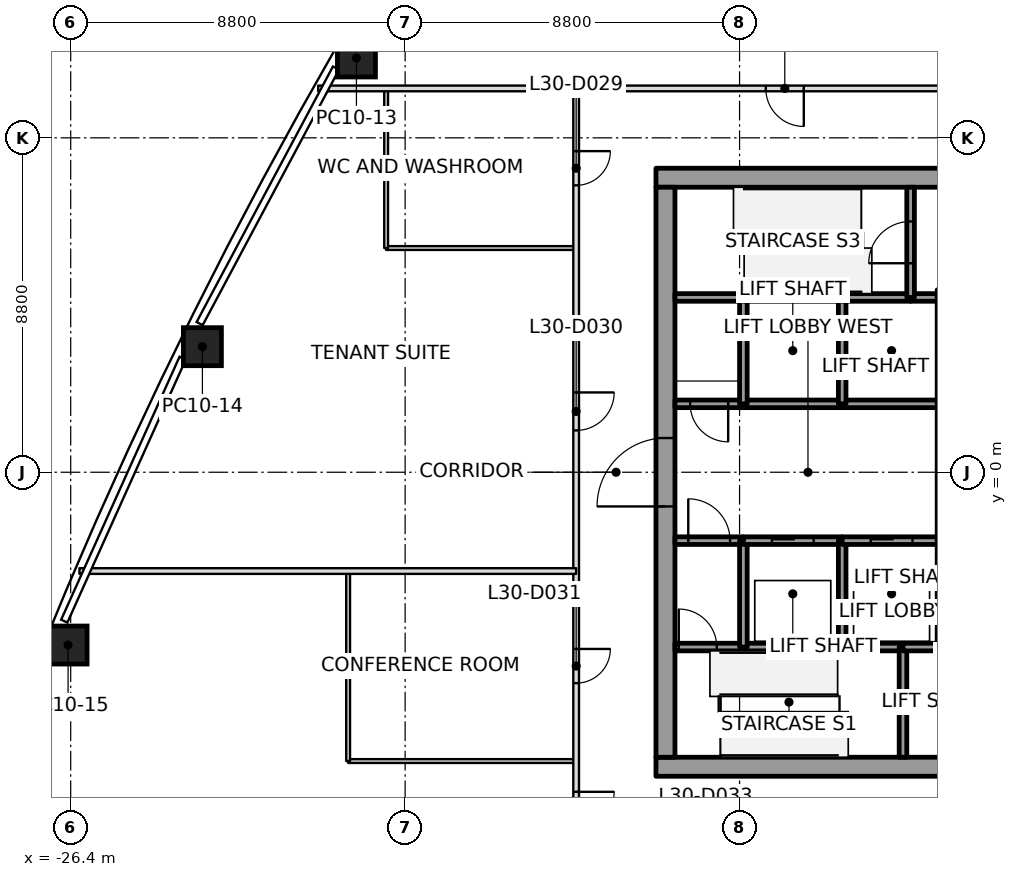
"""IFC4 building model, lengths in metres.
Left out: names, types, materials, properties, quantities, classifications, styles, units other than length and angle.
Written with IfcOpenShell. Run it as: python <this file> out.ifc"""

import sys

from ifc_helpers import new_model, si_unit, direction, frame, frame_2d, origin, origin_2d, place, context, subcontext, project, spatial, rectangle, extrude, element, fill, save


model = new_model("IFC4")
c1 = context("Model", 3, precision=1e-05, world=origin(), true_north=direction((0.0, 1.0)))
c2 = subcontext(c1, "Body", "Model", "MODEL_VIEW")
j1 = project(units=[si_unit("LENGTHUNIT", "METRE"), si_unit("PLANEANGLEUNIT", "RADIAN")], contexts=[c1])
p1 = place(None, origin())
s1 = spatial("IfcSite", under=j1, at=p1, CompositionType="ELEMENT")
p2 = place(p1, origin())
s2 = spatial("IfcBuilding", under=s1, at=p2, CompositionType="ELEMENT")
p3 = place(p2, frame((0.0, 0.0, 141.8)))
s3 = spatial("IfcBuildingStorey", under=s2, at=p3, CompositionType="ELEMENT", Elevation=141.8)
p4 = place(p3, frame((-18.882, 10.901, 0.0), z_axis=(0.009887052741, -0.005675900648, 0.999935013058), x_axis=(0.49997556095, 0.866039512773, -2.7732311e-05)))
e1 = element("IfcColumn", 1, at=p4, inside=s3, PredefinedType="COLUMN", context=c2, shape_type="SweptSolid", body=[
    extrude(rectangle(XDim=1.0, YDim=1.0, at=origin_2d()), origin(), (0.0, 0.0, 1.0), 4.0),
])
p5 = place(p3, frame((-22.935, 3.304, 0.0), z_axis=(0.014097689605, 0.002074984617, 0.999898469639), x_axis=(0.440788534912, 0.897574633958, -0.008077373603)))
e2 = element("IfcColumn", 2, at=p5, inside=s3, PredefinedType="COLUMN", context=c2, shape_type="SweptSolid", body=[
    extrude(rectangle(XDim=1.0, YDim=1.0, at=origin_2d()), origin(), (0.0, 0.0, 1.0), 4.0),
])
p6 = place(p3, frame((-26.469, -4.547, 0.0), z_axis=(0.017879535448, 0.010068680372, 0.999789449778), x_axis=(0.379623141119, 0.925001037033, -0.016104415983)))
e3 = element("IfcColumn", 3, at=p6, inside=s3, PredefinedType="COLUMN", context=c2, shape_type="SweptSolid", body=[
    extrude(rectangle(XDim=1.0, YDim=1.0, at=origin_2d()), origin(), (0.0, 0.0, 1.0), 4.001),
])
p7 = place(p3, frame((-11.0, -7.75, 0.0), z_axis=(0.0, 0.0, 1.0), x_axis=(1.0, 0.0, 0.0)))
e4 = element("IfcWall", 4, at=p7, inside=s3, PredefinedType="SHEAR", context=c2, shape_type="SweptSolid", body=[
    extrude(rectangle(XDim=22.0, YDim=0.5, at=frame_2d((11.0, 0.0))), origin(), (0.0, 0.0, 1.0), 4.0),
])
p8 = place(p7, frame((10.45, 0.0, 0.0)))
e5 = element("IfcOpeningElement", 5, at=p8, cuts=e4, PredefinedType="OPENING", context=c2, shape_type="SweptSolid", body=[
    extrude(rectangle(XDim=1.1, YDim=2.1, at=frame_2d((0.55, 1.05))), frame((0.0, 0.25, 0.0), z_axis=(0.0, -1.0, 0.0), x_axis=(1.0, 0.0, 0.0)), (0.0, 0.0, 1.0), 0.5),
])
p9 = place(p3, frame((-11.0, 7.75, 0.0), z_axis=(0.0, 0.0, 1.0), x_axis=(1.0, 0.0, 0.0)))
e6 = element("IfcWall", 6, at=p9, inside=s3, PredefinedType="SHEAR", context=c2, shape_type="SweptSolid", body=[
    extrude(rectangle(XDim=22.0, YDim=0.5, at=frame_2d((11.0, 0.0))), origin(), (0.0, 0.0, 1.0), 4.0),
])
p10 = place(p9, frame((10.45, 0.0, 0.0)))
e7 = element("IfcOpeningElement", 7, at=p10, cuts=e6, PredefinedType="OPENING", context=c2, shape_type="SweptSolid", body=[
    extrude(rectangle(XDim=1.1, YDim=2.1, at=frame_2d((0.55, 1.05))), frame((0.0, 0.25, 0.0), z_axis=(0.0, -1.0, 0.0), x_axis=(1.0, 0.0, 0.0)), (0.0, 0.0, 1.0), 0.5),
])
p11 = place(p3, frame((-10.75, -7.5, 0.0), z_axis=(0.0, 0.0, 1.0), x_axis=(0.0, 1.0, 0.0)))
e8 = element("IfcWall", 8, at=p11, inside=s3, PredefinedType="SHEAR", context=c2, shape_type="SweptSolid", body=[
    extrude(rectangle(XDim=15.0, YDim=0.5, at=frame_2d((7.5, 0.0))), origin(), (0.0, 0.0, 1.0), 4.0),
])
p12 = place(p11, frame((6.6, 0.0, 0.0)))
e9 = element("IfcOpeningElement", 9, at=p12, cuts=e8, PredefinedType="OPENING", context=c2, shape_type="SweptSolid", body=[
    extrude(rectangle(XDim=1.8, YDim=2.1, at=frame_2d((0.9, 1.05))), frame((0.0, 0.25, 0.0), z_axis=(0.0, -1.0, 0.0), x_axis=(1.0, 0.0, 0.0)), (0.0, 0.0, 1.0), 0.5),
])
p13 = place(p3, frame((-10.5, -4.6, 0.0), z_axis=(0.0, 0.0, 1.0), x_axis=(1.0, 0.0, 0.0)))
e10 = element("IfcWall", 10, at=p13, inside=s3, PredefinedType="SOLIDWALL", context=c2, shape_type="SweptSolid", body=[
    extrude(rectangle(XDim=1.8, YDim=0.2, at=frame_2d((0.9, 0.0))), origin(), (0.0, 0.0, 1.0), 3.85),
])
p14 = place(p13, frame((0.1, 0.0, 0.0)))
e11 = element("IfcOpeningElement", 11, at=p14, cuts=e10, PredefinedType="OPENING", context=c2, shape_type="SweptSolid", body=[
    extrude(rectangle(XDim=1.0, YDim=2.1, at=frame_2d((0.5, 1.05))), frame((0.0, 0.1, 0.0), z_axis=(0.0, -1.0, 0.0), x_axis=(1.0, 0.0, 0.0)), (0.0, 0.0, 1.0), 0.2),
])
p15 = place(p3, frame((-10.5, -1.8, 0.0), z_axis=(0.0, 0.0, 1.0), x_axis=(1.0, 0.0, 0.0)))
e12 = element("IfcWall", 12, at=p15, inside=s3, PredefinedType="SOLIDWALL", context=c2, shape_type="SweptSolid", body=[
    extrude(rectangle(XDim=1.8, YDim=0.2, at=frame_2d((0.9, 0.0))), origin(), (0.0, 0.0, 1.0), 3.85),
])
p16 = place(p15, frame((0.35, 0.0, 0.0)))
e13 = element("IfcOpeningElement", 13, at=p16, cuts=e12, PredefinedType="OPENING", context=c2, shape_type="SweptSolid", body=[
    extrude(rectangle(XDim=1.1, YDim=2.1, at=frame_2d((0.55, 1.05))), frame((0.0, 0.1, 0.0), z_axis=(0.0, -1.0, 0.0), x_axis=(1.0, 0.0, 0.0)), (0.0, 0.0, 1.0), 0.2),
])
p17 = place(p3, frame((-8.7, 1.8, 0.0), z_axis=(0.0, 0.0, 1.0), x_axis=(-1.0, 0.0, 0.0)))
e14 = element("IfcWall", 14, at=p17, inside=s3, PredefinedType="SOLIDWALL", context=c2, shape_type="SweptSolid", body=[
    extrude(rectangle(XDim=1.8, YDim=0.2, at=frame_2d((0.9, 0.0))), origin(), (0.0, 0.0, 1.0), 3.85),
])
p18 = place(p17, frame((0.4, 0.0, 0.0)))
e15 = element("IfcOpeningElement", 15, at=p18, cuts=e14, PredefinedType="OPENING", context=c2, shape_type="SweptSolid", body=[
    extrude(rectangle(XDim=1.0, YDim=2.1, at=frame_2d((0.5, 1.05))), frame((0.0, 0.1, 0.0), z_axis=(0.0, -1.0, 0.0), x_axis=(1.0, 0.0, 0.0)), (0.0, 0.0, 1.0), 0.2),
])
p19 = place(p3, frame((-8.7, 4.6, 0.0), z_axis=(0.0, 0.0, 1.0), x_axis=(-1.0, 0.0, 0.0)))
e16 = element("IfcWall", 16, at=p19, inside=s3, PredefinedType="SOLIDWALL", context=c2, shape_type="SweptSolid", body=[
    extrude(rectangle(XDim=1.8, YDim=0.2, at=frame_2d((0.9, 0.0))), origin(), (0.0, 0.0, 1.0), 3.85),
])
p20 = place(p3, frame((-8.7, -4.6, 0.0), z_axis=(0.0, 0.0, 1.0), x_axis=(1.0, 0.0, 0.0)))
e17 = element("IfcWall", 17, at=p20, inside=s3, PredefinedType="SOLIDWALL", context=c2, shape_type="SweptSolid", body=[
    extrude(rectangle(XDim=2.6, YDim=0.2, at=frame_2d((1.3, 0.0))), origin(), (0.0, 0.0, 1.0), 3.85),
])
p21 = place(p3, frame((-8.7, -4.6, 0.0), z_axis=(0.0, 0.0, 1.0), x_axis=(0.0, 1.0, 0.0)))
e18 = element("IfcWall", 18, at=p21, inside=s3, PredefinedType="SOLIDWALL", context=c2, shape_type="SweptSolid", body=[
    extrude(rectangle(XDim=2.8, YDim=0.2, at=frame_2d((1.4, 0.0))), origin(), (0.0, 0.0, 1.0), 3.85),
])
p22 = place(p3, frame((-8.7, -1.8, 0.0), z_axis=(0.0, 0.0, 1.0), x_axis=(1.0, 0.0, 0.0)))
e19 = element("IfcWall", 19, at=p22, inside=s3, PredefinedType="SOLIDWALL", context=c2, shape_type="SweptSolid", body=[
    extrude(rectangle(XDim=2.6, YDim=0.2, at=frame_2d((1.3, 0.0))), origin(), (0.0, 0.0, 1.0), 3.85),
])
p23 = place(p22, frame((0.75, 0.0, 0.0)))
e20 = element("IfcOpeningElement", 20, at=p23, cuts=e19, PredefinedType="OPENING", context=c2, shape_type="SweptSolid", body=[
    extrude(rectangle(XDim=1.1, YDim=2.1, at=frame_2d((0.55, 1.05))), frame((0.0, 0.1, 0.0), z_axis=(0.0, -1.0, 0.0), x_axis=(1.0, 0.0, 0.0)), (0.0, 0.0, 1.0), 0.2),
])
p24 = place(p3, frame((-6.1, 1.8, 0.0), z_axis=(0.0, 0.0, 1.0), x_axis=(-1.0, 0.0, 0.0)))
e21 = element("IfcWall", 21, at=p24, inside=s3, PredefinedType="SOLIDWALL", context=c2, shape_type="SweptSolid", body=[
    extrude(rectangle(XDim=2.6, YDim=0.2, at=frame_2d((1.3, 0.0))), origin(), (0.0, 0.0, 1.0), 3.85),
])
p25 = place(p3, frame((-8.7, 1.8, 0.0), z_axis=(0.0, 0.0, 1.0), x_axis=(0.0, 1.0, 0.0)))
e22 = element("IfcWall", 22, at=p25, inside=s3, PredefinedType="SOLIDWALL", context=c2, shape_type="SweptSolid", body=[
    extrude(rectangle(XDim=2.8, YDim=0.2, at=frame_2d((1.4, 0.0))), origin(), (0.0, 0.0, 1.0), 3.85),
])
p26 = place(p3, frame((-6.1, 4.6, 0.0), z_axis=(0.0, 0.0, 1.0), x_axis=(-1.0, 0.0, 0.0)))
e23 = element("IfcWall", 23, at=p26, inside=s3, PredefinedType="SOLIDWALL", context=c2, shape_type="SweptSolid", body=[
    extrude(rectangle(XDim=2.6, YDim=0.2, at=frame_2d((1.3, 0.0))), origin(), (0.0, 0.0, 1.0), 3.85),
])
p27 = place(p3, frame((-6.1, -4.6, 0.0), z_axis=(0.0, 0.0, 1.0), x_axis=(1.0, 0.0, 0.0)))
e24 = element("IfcWall", 24, at=p27, inside=s3, PredefinedType="SOLIDWALL", context=c2, shape_type="SweptSolid", body=[
    extrude(rectangle(XDim=1.6, YDim=0.2, at=frame_2d((0.8, 0.0))), origin(), (0.0, 0.0, 1.0), 3.85),
])
p28 = place(p3, frame((-6.1, -4.6, 0.0), z_axis=(0.0, 0.0, 1.0), x_axis=(0.0, 1.0, 0.0)))
e25 = element("IfcWall", 25, at=p28, inside=s3, PredefinedType="SOLIDWALL", context=c2, shape_type="SweptSolid", body=[
    extrude(rectangle(XDim=2.8, YDim=0.2, at=frame_2d((1.4, 0.0))), origin(), (0.0, 0.0, 1.0), 3.85),
])
p29 = place(p3, frame((-6.1, -1.8, 0.0), z_axis=(0.0, 0.0, 1.0), x_axis=(1.0, 0.0, 0.0)))
e26 = element("IfcWall", 26, at=p29, inside=s3, PredefinedType="SOLIDWALL", context=c2, shape_type="SweptSolid", body=[
    extrude(rectangle(XDim=2.6, YDim=0.2, at=frame_2d((1.3, 0.0))), origin(), (0.0, 0.0, 1.0), 3.85),
])
p30 = place(p29, frame((0.75, 0.0, 0.0)))
e27 = element("IfcOpeningElement", 27, at=p30, cuts=e26, PredefinedType="OPENING", context=c2, shape_type="SweptSolid", body=[
    extrude(rectangle(XDim=1.1, YDim=2.1, at=frame_2d((0.55, 1.05))), frame((0.0, 0.1, 0.0), z_axis=(0.0, -1.0, 0.0), x_axis=(1.0, 0.0, 0.0)), (0.0, 0.0, 1.0), 0.2),
])
p31 = place(p3, frame((-3.5, 1.8, 0.0), z_axis=(0.0, 0.0, 1.0), x_axis=(-1.0, 0.0, 0.0)))
e28 = element("IfcWall", 28, at=p31, inside=s3, PredefinedType="SOLIDWALL", context=c2, shape_type="SweptSolid", body=[
    extrude(rectangle(XDim=2.6, YDim=0.2, at=frame_2d((1.3, 0.0))), origin(), (0.0, 0.0, 1.0), 3.85),
])
p32 = place(p3, frame((-6.1, 1.8, 0.0), z_axis=(0.0, 0.0, 1.0), x_axis=(0.0, 1.0, 0.0)))
e29 = element("IfcWall", 29, at=p32, inside=s3, PredefinedType="SOLIDWALL", context=c2, shape_type="SweptSolid", body=[
    extrude(rectangle(XDim=2.8, YDim=0.2, at=frame_2d((1.4, 0.0))), origin(), (0.0, 0.0, 1.0), 3.85),
])
p33 = place(p3, frame((-4.3, 4.6, 0.0), z_axis=(0.0, 0.0, 1.0), x_axis=(-1.0, 0.0, 0.0)))
e30 = element("IfcWall", 30, at=p33, inside=s3, PredefinedType="SOLIDWALL", context=c2, shape_type="SweptSolid", body=[
    extrude(rectangle(XDim=1.8, YDim=0.2, at=frame_2d((0.9, 0.0))), origin(), (0.0, 0.0, 1.0), 3.85),
])
p34 = place(p3, frame((-4.5, -4.6, 0.0), z_axis=(0.0, 0.0, 1.0), x_axis=(0.0, -1.0, 0.0)))
e31 = element("IfcWall", 31, at=p34, inside=s3, PredefinedType="SOLIDWALL", context=c2, shape_type="SweptSolid", body=[
    extrude(rectangle(XDim=2.9, YDim=0.2, at=frame_2d((1.45, 0.0))), origin(), (0.0, 0.0, 1.0), 3.85),
])
p35 = place(p3, frame((-4.5, -4.6, 0.0), z_axis=(0.0, 0.0, 1.0), x_axis=(1.0, 0.0, 0.0)))
e32 = element("IfcWall", 32, at=p35, inside=s3, PredefinedType="SOLIDWALL", context=c2, shape_type="SweptSolid", body=[
    extrude(rectangle(XDim=1.0, YDim=0.2, at=frame_2d((0.5, 0.0))), origin(), (0.0, 0.0, 1.0), 3.85),
])
p36 = place(p3, frame((-3.5, 4.6, 0.0), z_axis=(0.0, 0.0, 1.0), x_axis=(-1.0, 0.0, 0.0)))
e33 = element("IfcWall", 33, at=p36, inside=s3, PredefinedType="SOLIDWALL", context=c2, shape_type="SweptSolid", body=[
    extrude(rectangle(XDim=0.8, YDim=0.2, at=frame_2d((0.4, 0.0))), origin(), (0.0, 0.0, 1.0), 3.85),
])
p37 = place(p3, frame((-4.3, 4.6, 0.0), z_axis=(0.0, 0.0, 1.0), x_axis=(0.0, 1.0, 0.0)))
e34 = element("IfcWall", 34, at=p37, inside=s3, PredefinedType="SOLIDWALL", context=c2, shape_type="SweptSolid", body=[
    extrude(rectangle(XDim=2.9, YDim=0.2, at=frame_2d((1.45, 0.0))), origin(), (0.0, 0.0, 1.0), 3.85),
])
p38 = place(p37, frame((0.9, 0.0, 0.0)))
e35 = element("IfcOpeningElement", 35, at=p38, cuts=e34, PredefinedType="OPENING", context=c2, shape_type="SweptSolid", body=[
    extrude(rectangle(XDim=1.1, YDim=2.1, at=frame_2d((0.55, 1.05))), frame((0.0, 0.1, 0.0), z_axis=(0.0, -1.0, 0.0), x_axis=(1.0, 0.0, 0.0)), (0.0, 0.0, 1.0), 0.2),
])
p39 = place(p3, frame((-13.1, -2.6, 0.0), z_axis=(0.0, 0.0, 1.0), x_axis=(-1.0, 0.0, 0.0)))
e36 = element("IfcWall", 36, at=p39, inside=s3, PredefinedType="PARTITIONING", context=c2, shape_type="SweptSolid", body=[
    extrude(rectangle(XDim=13.07, YDim=0.15, at=frame_2d((6.535, 0.0))), origin(), (0.0, 0.0, 1.0), 3.234),
])
p40 = place(p3, frame((-13.1, 10.1, 0.0), z_axis=(0.0, 0.0, 1.0), x_axis=(-1.0, 0.0, 0.0)))
e37 = element("IfcWall", 37, at=p40, inside=s3, PredefinedType="PARTITIONING", context=c2, shape_type="SweptSolid", body=[
    extrude(rectangle(XDim=6.788, YDim=0.15, at=frame_2d((3.394, 0.0))), origin(), (0.0, 0.0, 1.0), 3.234),
])
p41 = place(p3, frame((-13.1, 10.02, 0.0), z_axis=(0.0, 0.0, 1.0), x_axis=(0.0, -1.0, 0.0)))
e38 = element("IfcWall", 38, at=p41, inside=s3, PredefinedType="PARTITIONING", context=c2, shape_type="SweptSolid", body=[
    extrude(rectangle(XDim=20.04, YDim=0.15, at=frame_2d((10.02, 0.0))), origin(), (0.0, 0.0, 1.0), 3.166),
])
p42 = place(p41, frame((1.57, 0.0, 0.0)))
e39 = element("IfcOpeningElement", 39, at=p42, cuts=e38, PredefinedType="OPENING", context=c2, shape_type="SweptSolid", body=[
    extrude(rectangle(XDim=0.9, YDim=2.1, at=frame_2d((0.45, 1.05))), frame((0.0, 0.075, 0.0), z_axis=(0.0, -1.0, 0.0), x_axis=(1.0, 0.0, 0.0)), (0.0, 0.0, 1.0), 0.15),
])
p43 = place(p41, frame((7.92, 0.0, 0.0)))
e40 = element("IfcOpeningElement", 40, at=p43, cuts=e38, PredefinedType="OPENING", context=c2, shape_type="SweptSolid", body=[
    extrude(rectangle(XDim=1.0, YDim=2.1, at=frame_2d((0.5, 1.05))), frame((0.0, 0.075, 0.0), z_axis=(0.0, -1.0, 0.0), x_axis=(1.0, 0.0, 0.0)), (0.0, 0.0, 1.0), 0.15),
])
p44 = place(p41, frame((14.67, 0.0, 0.0)))
e41 = element("IfcOpeningElement", 41, at=p44, cuts=e38, PredefinedType="OPENING", context=c2, shape_type="SweptSolid", body=[
    extrude(rectangle(XDim=0.9, YDim=2.1, at=frame_2d((0.45, 1.05))), frame((0.0, 0.075, 0.0), z_axis=(0.0, -1.0, 0.0), x_axis=(1.0, 0.0, 0.0)), (0.0, 0.0, 1.0), 0.15),
])
p45 = place(p41, frame((18.43, 0.0, 0.0)))
e42 = element("IfcOpeningElement", 42, at=p45, cuts=e38, PredefinedType="OPENING", context=c2, shape_type="SweptSolid", body=[
    extrude(rectangle(XDim=1.0, YDim=2.1, at=frame_2d((0.5, 1.05))), frame((0.0, 0.075, 0.0), z_axis=(0.0, -1.0, 0.0), x_axis=(1.0, 0.0, 0.0)), (0.0, 0.0, 1.0), 0.15),
])
p46 = place(p3, frame((12.791, 10.1, 0.0), z_axis=(0.0, 0.0, 1.0), x_axis=(-1.0, 0.0, 0.0)))
e43 = element("IfcWall", 43, at=p46, inside=s3, PredefinedType="PARTITIONING", context=c2, shape_type="SweptSolid", body=[
    extrude(rectangle(XDim=25.811, YDim=0.15, at=frame_2d((12.906, 0.0))), origin(), (0.0, 0.0, 1.0), 3.166),
])
p47 = place(p46, frame((6.946, 0.0, 0.0)))
e44 = element("IfcOpeningElement", 44, at=p47, cuts=e43, PredefinedType="OPENING", context=c2, shape_type="SweptSolid", body=[
    extrude(rectangle(XDim=1.0, YDim=2.1, at=frame_2d((0.5, 1.05))), frame((0.0, 0.075, 0.0), z_axis=(0.0, -1.0, 0.0), x_axis=(1.0, 0.0, 0.0)), (0.0, 0.0, 1.0), 0.15),
])
p48 = place(p46, frame((19.901, 0.0, 0.0)))
e45 = element("IfcOpeningElement", 45, at=p48, cuts=e43, PredefinedType="OPENING", context=c2, shape_type="SweptSolid", body=[
    extrude(rectangle(XDim=1.0, YDim=2.1, at=frame_2d((0.5, 1.05))), frame((0.0, 0.075, 0.0), z_axis=(0.0, -1.0, 0.0), x_axis=(1.0, 0.0, 0.0)), (0.0, 0.0, 1.0), 0.15),
])
p49 = place(p3, frame((-13.13, -7.6, 0.0), z_axis=(0.0, 0.0, 1.0), x_axis=(-1.0, 0.0, 0.0)))
e46 = element("IfcWall", 46, at=p49, inside=s3, PredefinedType="PARTITIONING", context=c2, shape_type="SweptSolid", body=[
    extrude(rectangle(XDim=5.97, YDim=0.1, at=frame_2d((2.985, 0.0))), origin(), (0.0, 0.0, 1.0), 3.247),
])
p50 = place(p3, frame((-19.1, -7.6, 0.0), z_axis=(0.0, 0.0, 1.0), x_axis=(0.0, 1.0, 0.0)))
e47 = element("IfcWall", 47, at=p50, inside=s3, PredefinedType="PARTITIONING", context=c2, shape_type="SweptSolid", body=[
    extrude(rectangle(XDim=4.97, YDim=0.1, at=frame_2d((2.485, 0.0))), origin(), (0.0, 0.0, 1.0), 3.247),
])
p51 = place(p3, frame((-13.13, 5.9, 0.0), z_axis=(0.0, 0.0, 1.0), x_axis=(-1.0, 0.0, 0.0)))
e48 = element("IfcWall", 48, at=p51, inside=s3, PredefinedType="PARTITIONING", context=c2, shape_type="SweptSolid", body=[
    extrude(rectangle(XDim=4.97, YDim=0.1, at=frame_2d((2.485, 0.0))), origin(), (0.0, 0.0, 1.0), 3.393),
])
p52 = place(p3, frame((-18.1, 5.9, 0.0), z_axis=(0.0, 0.0, 1.0), x_axis=(0.0, 1.0, 0.0)))
e49 = element("IfcWall", 49, at=p52, inside=s3, PredefinedType="PARTITIONING", context=c2, shape_type="SweptSolid", body=[
    extrude(rectangle(XDim=4.17, YDim=0.1, at=frame_2d((2.085, 0.0))), origin(), (0.0, 0.0, 1.0), 3.393),
])
p53 = place(p48, origin())
e50 = element("IfcDoor", 50, at=p53, inside=s3, OperationType="SINGLE_SWING_LEFT", PredefinedType="DOOR", context=c2, shape_type="SweptSolid", body=[
    extrude(rectangle(XDim=1.0, YDim=2.1, at=frame_2d((0.5, 1.05))), frame((0.0, 0.025, 0.0), z_axis=(0.0, -1.0, 0.0), x_axis=(1.0, 0.0, 0.0)), (0.0, 0.0, 1.0), 0.05),
])
fill(e45, e50)
p54 = place(p42, origin())
e51 = element("IfcDoor", 51, at=p54, inside=s3, OperationType="SINGLE_SWING_RIGHT", PredefinedType="DOOR", context=c2, shape_type="SweptSolid", body=[
    extrude(rectangle(XDim=0.9, YDim=2.1, at=frame_2d((0.45, 1.05))), frame((0.0, 0.025, 0.0), z_axis=(0.0, -1.0, 0.0), x_axis=(1.0, 0.0, 0.0)), (0.0, 0.0, 1.0), 0.05),
])
fill(e39, e51)
p55 = place(p43, origin())
e52 = element("IfcDoor", 52, at=p55, inside=s3, OperationType="SINGLE_SWING_LEFT", PredefinedType="DOOR", context=c2, shape_type="SweptSolid", body=[
    extrude(rectangle(XDim=1.0, YDim=2.1, at=frame_2d((0.5, 1.05))), frame((0.0, 0.025, 0.0), z_axis=(0.0, -1.0, 0.0), x_axis=(1.0, 0.0, 0.0)), (0.0, 0.0, 1.0), 0.05),
])
fill(e40, e52)
p56 = place(p44, origin())
e53 = element("IfcDoor", 53, at=p56, inside=s3, OperationType="SINGLE_SWING_RIGHT", PredefinedType="DOOR", context=c2, shape_type="SweptSolid", body=[
    extrude(rectangle(XDim=0.9, YDim=2.1, at=frame_2d((0.45, 1.05))), frame((0.0, 0.025, 0.0), z_axis=(0.0, -1.0, 0.0), x_axis=(1.0, 0.0, 0.0)), (0.0, 0.0, 1.0), 0.05),
])
fill(e41, e53)
p57 = place(p45, origin())
e54 = element("IfcDoor", 54, at=p57, inside=s3, OperationType="SINGLE_SWING_RIGHT", PredefinedType="DOOR", context=c2, shape_type="SweptSolid", body=[
    extrude(rectangle(XDim=1.0, YDim=2.1, at=frame_2d((0.5, 1.05))), frame((0.0, 0.025, 0.0), z_axis=(0.0, -1.0, 0.0), x_axis=(1.0, 0.0, 0.0)), (0.0, 0.0, 1.0), 0.05),
])
fill(e42, e54)
p58 = place(p23, origin())
e55 = element("IfcDoor", 55, at=p58, inside=s3, OperationType="SLIDING_TO_RIGHT", PredefinedType="DOOR", context=c2, shape_type="SweptSolid", body=[
    extrude(rectangle(XDim=1.1, YDim=2.1, at=frame_2d((0.55, 1.05))), frame((0.0, 0.025, 0.0), z_axis=(0.0, -1.0, 0.0), x_axis=(1.0, 0.0, 0.0)), (0.0, 0.0, 1.0), 0.05),
])
fill(e20, e55)
p59 = place(p30, origin())
e56 = element("IfcDoor", 56, at=p59, inside=s3, OperationType="SLIDING_TO_RIGHT", PredefinedType="DOOR", context=c2, shape_type="SweptSolid", body=[
    extrude(rectangle(XDim=1.1, YDim=2.1, at=frame_2d((0.55, 1.05))), frame((0.0, 0.025, 0.0), z_axis=(0.0, -1.0, 0.0), x_axis=(1.0, 0.0, 0.0)), (0.0, 0.0, 1.0), 0.05),
])
fill(e27, e56)
p60 = place(p16, origin())
e57 = element("IfcDoor", 57, at=p60, inside=s3, OperationType="SINGLE_SWING_LEFT", PredefinedType="DOOR", context=c2, shape_type="SweptSolid", body=[
    extrude(rectangle(XDim=1.1, YDim=2.1, at=frame_2d((0.55, 1.05))), frame((0.0, 0.025, 0.0), z_axis=(0.0, -1.0, 0.0), x_axis=(1.0, 0.0, 0.0)), (0.0, 0.0, 1.0), 0.05),
])
fill(e13, e57)
p61 = place(p18, origin())
e58 = element("IfcDoor", 58, at=p61, inside=s3, OperationType="SINGLE_SWING_LEFT", PredefinedType="DOOR", context=c2, shape_type="SweptSolid", body=[
    extrude(rectangle(XDim=1.0, YDim=2.1, at=frame_2d((0.5, 1.05))), frame((0.0, 0.025, 0.0), z_axis=(0.0, -1.0, 0.0), x_axis=(1.0, 0.0, 0.0)), (0.0, 0.0, 1.0), 0.05),
])
fill(e15, e58)
p62 = place(p14, origin())
e59 = element("IfcDoor", 59, at=p62, inside=s3, OperationType="SINGLE_SWING_LEFT", PredefinedType="DOOR", context=c2, shape_type="SweptSolid", body=[
    extrude(rectangle(XDim=1.0, YDim=2.1, at=frame_2d((0.5, 1.05))), frame((0.0, 0.025, 0.0), z_axis=(0.0, -1.0, 0.0), x_axis=(1.0, 0.0, 0.0)), (0.0, 0.0, 1.0), 0.05),
])
fill(e11, e59)
p63 = place(p38, origin())
e60 = element("IfcDoor", 60, at=p63, inside=s3, OperationType="SINGLE_SWING_RIGHT", PredefinedType="DOOR", context=c2, shape_type="SweptSolid", body=[
    extrude(rectangle(XDim=1.1, YDim=2.1, at=frame_2d((0.55, 1.05))), frame((0.0, 0.025, 0.0), z_axis=(0.0, -1.0, 0.0), x_axis=(1.0, 0.0, 0.0)), (0.0, 0.0, 1.0), 0.05),
])
fill(e35, e60)
p64 = place(p12, origin())
e61 = element("IfcDoor", 61, at=p64, inside=s3, OperationType="DOUBLE_DOOR_SINGLE_SWING", PredefinedType="DOOR", context=c2, shape_type="SweptSolid", body=[
    extrude(rectangle(XDim=1.8, YDim=2.1, at=frame_2d((0.9, 1.05))), frame((0.0, 0.025, 0.0), z_axis=(0.0, -1.0, 0.0), x_axis=(1.0, 0.0, 0.0)), (0.0, 0.0, 1.0), 0.05),
])
fill(e9, e61)
save(model, sys.argv[1])
